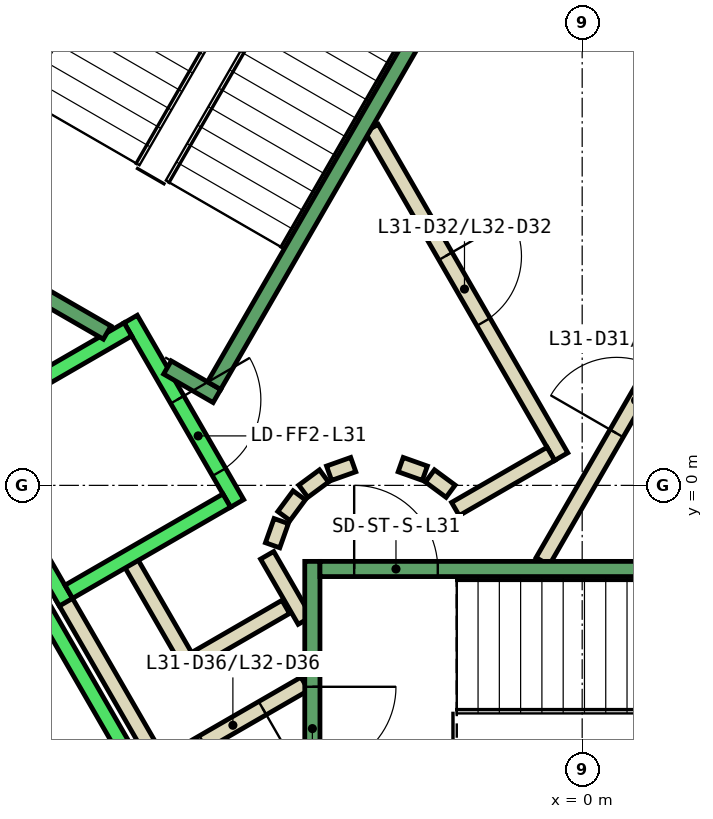
"""IFC4 building model, lengths in metres.
Left out: names, types, materials, properties, quantities, classifications, styles, units other than length and angle.
Written with IfcOpenShell. Run it as: python <this file> out.ifc"""

import sys

from ifc_helpers import new_model, si_unit, direction, frame, frame_2d, origin, place, context, subcontext, project, spatial, polyline, rectangle, outline, extrude, element, fill, save


model = new_model("IFC4")
c1 = context("Model", 3, precision=1e-05, world=origin(), true_north=direction((0.0, 1.0)))
c2 = subcontext(c1, "Body", "Model", "MODEL_VIEW")
j1 = project(units=[si_unit("LENGTHUNIT", "METRE"), si_unit("PLANEANGLEUNIT", "RADIAN")], contexts=[c1])
p1 = place(None, origin())
s1 = spatial("IfcSite", under=j1, at=p1, CompositionType="ELEMENT")
p2 = place(p1, origin())
s2 = spatial("IfcBuilding", under=s1, at=p2, CompositionType="ELEMENT")
p3 = place(p2, frame((0.0, 0.0, 142.4)))
s3 = spatial("IfcBuildingStorey", under=s2, at=p3, CompositionType="ELEMENT", Elevation=142.4)
p4 = place(p3, frame((0.0, 0.0, -0.4)))
e1 = element("IfcWall", 1, at=p4, inside=s3, PredefinedType="SHEAR", context=c2, shape_type="SweptSolid", body=[
    extrude(outline(polyline([(-12.267, 5.252), (-11.575, 4.852), (-6.466, 13.7), (-6.928, 14.5), (-12.267, 5.252)])), origin(), (0.0, 0.0, 1.0), 4.2),
])
p5 = place(p3, frame((0.0, 0.0, -0.4)))
e2 = element("IfcWall", 2, at=p5, inside=s3, PredefinedType="SHEAR", context=c2, shape_type="SweptSolid", body=[
    extrude(outline(polyline([(-13.856, 2.5), (-6.928, -9.5), (-6.466, -8.7), (-12.933, 2.5), (-13.856, 2.5)])), origin(), (0.0, 0.0, 1.0), 4.2),
])
p6 = place(p3, frame((-3.9, -1.599, 0.0), z_axis=(0.0, 0.0, 1.0), x_axis=(-0.865969445389, -0.500096910261, 0.0)))
e3 = element("IfcWall", 3, at=p6, inside=s3, PredefinedType="PARTITIONING", context=c2, shape_type="SweptSolid", body=[
    extrude(rectangle(XDim=1.373, YDim=0.2, at=frame_2d((0.687, 0.0))), origin(), (0.0, 0.0, 1.0), 3.8),
])
p7 = place(p3, frame((-5.126, -2.422, 0.0), z_axis=(0.0, 0.0, 1.0), x_axis=(-0.500062241894, 0.865989465428, 0.0)))
e4 = element("IfcWall", 4, at=p7, inside=s3, PredefinedType="PARTITIONING", context=c2, shape_type="SweptSolid", body=[
    extrude(rectangle(XDim=1.7, YDim=0.2, at=frame_2d((0.85, 0.0))), origin(), (0.0, 0.0, 1.0), 3.8),
])
p8 = place(p3, frame((-3.65, -2.61, 0.0), z_axis=(0.0, 0.0, 1.0), x_axis=(-0.866072462134, -0.499918483688, 0.0)))
e5 = element("IfcWall", 5, at=p8, inside=s3, PredefinedType="PARTITIONING", context=c2, shape_type="SweptSolid", body=[
    extrude(rectangle(XDim=2.084, YDim=0.2, at=frame_2d((1.042, 0.0))), origin(), (0.0, 0.0, 1.0), 3.8),
])
p9 = place(p8, frame((0.642, 0.0, 0.0)))
e6 = element("IfcOpeningElement", 6, at=p9, cuts=e5, PredefinedType="OPENING", context=c2, shape_type="SweptSolid", body=[
    extrude(rectangle(XDim=0.9, YDim=2.1, at=frame_2d((0.45, 1.05))), frame((0.0, 0.11, 0.0), z_axis=(0.0, -1.0, 0.0), x_axis=(1.0, 0.0, 0.0)), (0.0, 0.0, 1.0), 0.22),
])
p10 = place(p3, frame((-5.492, -3.788, 0.0), z_axis=(0.0, 0.0, 1.0), x_axis=(-0.500008949224, 0.866020236886, 0.0)))
e7 = element("IfcWall", 7, at=p10, inside=s3, PredefinedType="PARTITIONING", context=c2, shape_type="SweptSolid", body=[
    extrude(rectangle(XDim=2.68, YDim=0.2, at=frame_2d((1.34, 0.0))), origin(), (0.0, 0.0, 1.0), 3.8),
])
p11 = place(p3, frame((-4.145, -0.92, 0.0), z_axis=(0.0, 0.0, 1.0), x_axis=(0.499743786207, -0.866173278362, 0.0)))
e8 = element("IfcWall", 8, at=p11, inside=s3, PredefinedType="PARTITIONING", context=c2, shape_type="SweptSolid", body=[
    extrude(rectangle(XDim=0.991, YDim=0.2, at=frame_2d((0.495, 0.0))), origin(), (0.0, 0.0, 1.0), 3.8),
])
p12 = place(p3, frame((-0.52, -1.0, 0.0), z_axis=(0.0, 0.0, 1.0), x_axis=(0.50011622646, 0.865958290007, 0.0)))
e9 = element("IfcWall", 9, at=p12, inside=s3, PredefinedType="PARTITIONING", context=c2, shape_type="SweptSolid", body=[
    extrude(rectangle(XDim=4.991, YDim=0.2, at=frame_2d((2.496, 0.0))), origin(), (0.0, 0.0, 1.0), 3.8),
])
p13 = place(p12, frame((1.945, 0.0, 0.0)))
e10 = element("IfcOpeningElement", 10, at=p13, cuts=e9, PredefinedType="OPENING", context=c2, shape_type="SweptSolid", body=[
    extrude(rectangle(XDim=1.0, YDim=2.1, at=frame_2d((0.5, 1.05))), frame((0.0, 0.11, 0.0), z_axis=(0.0, -1.0, 0.0), x_axis=(1.0, 0.0, 0.0)), (0.0, 0.0, 1.0), 0.22),
])
p14 = place(p3, frame((-2.771, 4.7, 0.0), z_axis=(0.0, 0.0, 1.0), x_axis=(0.499969479948, -0.866043023828, 0.0)))
e11 = element("IfcWall", 11, at=p14, inside=s3, PredefinedType="PARTITIONING", context=c2, shape_type="SweptSolid", body=[
    extrude(rectangle(XDim=4.99, YDim=0.2, at=frame_2d((2.495, 0.0))), origin(), (0.0, 0.0, 1.0), 3.8),
])
p15 = place(p14, frame((1.945, 0.0, 0.0)))
e12 = element("IfcOpeningElement", 12, at=p15, cuts=e11, PredefinedType="OPENING", context=c2, shape_type="SweptSolid", body=[
    extrude(rectangle(XDim=1.0, YDim=2.1, at=frame_2d((0.5, 1.05))), frame((0.0, 0.11, 0.0), z_axis=(0.0, -1.0, 0.0), x_axis=(1.0, 0.0, 0.0)), (0.0, 0.0, 1.0), 0.22),
])
p16 = place(p3, frame((-0.412, 0.414, 0.0), z_axis=(0.0, 0.0, 1.0), x_axis=(-0.866017369001, -0.500013916395, 0.0)))
e13 = element("IfcWall", 13, at=p16, inside=s3, PredefinedType="PARTITIONING", context=c2, shape_type="SweptSolid", body=[
    extrude(rectangle(XDim=1.45, YDim=0.2, at=frame_2d((0.725, 0.0))), origin(), (0.0, 0.0, 1.0), 3.8),
])
p17 = place(p3, frame((-1.731, -0.077, 0.0), z_axis=(0.0, 0.0, 1.0), x_axis=(-0.804311165252, 0.594208338422, 0.0)))
e14 = element("IfcWall", 14, at=p17, inside=s3, PredefinedType="PARTITIONING", context=c2, shape_type="SweptSolid", body=[
    extrude(rectangle(XDim=0.338, YDim=0.2, at=frame_2d((0.169, 0.0))), origin(), (0.0, 0.0, 1.0), 3.8),
])
p18 = place(p3, frame((-2.07, 0.16, 0.0), z_axis=(0.0, 0.0, 1.0), x_axis=(-0.942199461132, 0.335052496547, 0.0)))
e15 = element("IfcWall", 15, at=p18, inside=s3, PredefinedType="PARTITIONING", context=c2, shape_type="SweptSolid", body=[
    extrude(rectangle(XDim=0.337, YDim=0.2, at=frame_2d((0.169, 0.0))), origin(), (0.0, 0.0, 1.0), 3.8),
])
p19 = place(p3, frame((-3.012, 0.273, 0.0), z_axis=(0.0, 0.0, 1.0), x_axis=(-0.942280615813, -0.334824194261, 0.0)))
e16 = element("IfcWall", 16, at=p19, inside=s3, PredefinedType="PARTITIONING", context=c2, shape_type="SweptSolid", body=[
    extrude(rectangle(XDim=0.338, YDim=0.2, at=frame_2d((0.169, 0.0))), origin(), (0.0, 0.0, 1.0), 3.8),
])
p20 = place(p3, frame((-3.397, 0.124, 0.0), z_axis=(0.0, 0.0, 1.0), x_axis=(-0.804311165252, -0.594208338422, 0.0)))
e17 = element("IfcWall", 17, at=p20, inside=s3, PredefinedType="PARTITIONING", context=c2, shape_type="SweptSolid", body=[
    extrude(rectangle(XDim=0.338, YDim=0.2, at=frame_2d((0.169, 0.0))), origin(), (0.0, 0.0, 1.0), 3.8),
])
p21 = place(p3, frame((-3.723, -0.131, 0.0), z_axis=(0.0, 0.0, 1.0), x_axis=(-0.594675113454, -0.803966112121, 0.0)))
e18 = element("IfcWall", 18, at=p21, inside=s3, PredefinedType="PARTITIONING", context=c2, shape_type="SweptSolid", body=[
    extrude(rectangle(XDim=0.338, YDim=0.2, at=frame_2d((0.169, 0.0))), origin(), (0.0, 0.0, 1.0), 3.8),
])
p22 = place(p3, frame((-3.96, -0.47, 0.0), z_axis=(0.0, 0.0, 1.0), x_axis=(-0.334824194261, -0.942280615813, 0.0)))
e19 = element("IfcWall", 19, at=p22, inside=s3, PredefinedType="PARTITIONING", context=c2, shape_type="SweptSolid", body=[
    extrude(rectangle(XDim=0.338, YDim=0.2, at=frame_2d((0.169, 0.0))), origin(), (0.0, 0.0, 1.0), 3.8),
])
p23 = place(p3, frame((-5.94, 2.188, 0.0), z_axis=(0.0, 0.0, 1.0), x_axis=(0.49994636267, -0.866056369097, 0.0)))
e20 = element("IfcWall", 20, at=p23, inside=s3, PredefinedType="STANDARD", context=c2, shape_type="SweptSolid", body=[
    extrude(rectangle(XDim=2.8, YDim=0.2, at=frame_2d((1.4, 0.0))), origin(), (0.0, 0.0, 1.0), 3.8),
])
p24 = place(p23, frame((1.225, 0.0, 0.0)))
e21 = element("IfcOpeningElement", 21, at=p24, cuts=e20, PredefinedType="OPENING", context=c2, shape_type="SweptSolid", body=[
    extrude(rectangle(XDim=1.1, YDim=2.1, at=frame_2d((0.55, 1.05))), frame((0.0, 0.11, 0.0), z_axis=(0.0, -1.0, 0.0), x_axis=(1.0, 0.0, 0.0)), (0.0, 0.0, 1.0), 0.22),
])
p25 = place(p3, frame((-8.192, 0.888, 0.0), z_axis=(0.0, 0.0, 1.0), x_axis=(0.49994636267, -0.866056369097, 0.0)))
e22 = element("IfcWall", 22, at=p25, inside=s3, PredefinedType="STANDARD", context=c2, shape_type="SweptSolid", body=[
    extrude(rectangle(XDim=2.8, YDim=0.2, at=frame_2d((1.4, 0.0))), origin(), (0.0, 0.0, 1.0), 3.8),
])
for number, where, z_axis, x_axis in (
    (23, (-5.977, 2.052, 0.0), (0.0, 0.0, 1.0), (-0.866, -0.5, 0.0)),
    (24, (-4.677, -0.2, 0.0), (0.0, 0.0, 1.0), (-0.866, -0.5, 0.0)),
):
    element("IfcWall", number, at=place(p3, frame(where, z_axis=z_axis, x_axis=x_axis)), inside=s3, PredefinedType="STANDARD", context=c2, shape_type="SweptSolid", body=[
        extrude(rectangle(XDim=2.399, YDim=0.2, at=frame_2d((1.2, 0.0))), origin(), (0.0, 0.0, 1.0), 3.8),
    ])
p26 = place(p3, frame((-9.751, 2.99, 0.0), z_axis=(0.0, 0.0, 1.0), x_axis=(0.50000090737, -0.866024879913, 0.0)))
e25 = element("IfcWall", 25, at=p26, inside=s3, PredefinedType="STANDARD", context=c2, shape_type="SweptSolid", body=[
    extrude(rectangle(XDim=10.6, YDim=0.2, at=frame_2d((5.3, 0.0))), origin(), (0.0, 0.0, 1.0), 3.8),
])
p27 = place(p3, frame((-3.55, -1.0, 0.0), z_axis=(0.0, 0.0, 1.0), x_axis=(0.0, -1.0, 0.0)))
e26 = element("IfcWall", 26, at=p27, inside=s3, PredefinedType="STANDARD", context=c2, shape_type="SweptSolid", body=[
    extrude(rectangle(XDim=4.4, YDim=0.2, at=frame_2d((2.2, 0.0))), origin(), (0.0, 0.0, 1.0), 3.8),
])
p28 = place(p27, frame((1.65, 0.0, 0.0)))
e27 = element("IfcOpeningElement", 27, at=p28, cuts=e26, PredefinedType="OPENING", context=c2, shape_type="SweptSolid", body=[
    extrude(rectangle(XDim=1.1, YDim=2.2, at=frame_2d((0.55, 1.1))), frame((0.0, 0.11, 0.0), z_axis=(0.0, -1.0, 0.0), x_axis=(1.0, 0.0, 0.0)), (0.0, 0.0, 1.0), 0.22),
])
p29 = place(p3, frame((-3.45, -1.1, 0.0), z_axis=(0.0, 0.0, 1.0), x_axis=(1.0, 0.0, 0.0)))
e28 = element("IfcWall", 28, at=p29, inside=s3, PredefinedType="STANDARD", context=c2, shape_type="SweptSolid", body=[
    extrude(rectangle(XDim=6.9, YDim=0.2, at=frame_2d((3.45, 0.0))), origin(), (0.0, 0.0, 1.0), 3.8),
])
p30 = place(p29, frame((0.45, 0.0, 0.0)))
e29 = element("IfcOpeningElement", 29, at=p30, cuts=e28, PredefinedType="OPENING", context=c2, shape_type="SweptSolid", body=[
    extrude(rectangle(XDim=1.1, YDim=2.2, at=frame_2d((0.55, 1.1))), frame((0.0, 0.11, 0.0), z_axis=(0.0, -1.0, 0.0), x_axis=(1.0, 0.0, 0.0)), (0.0, 0.0, 1.0), 0.22),
])
p31 = place(p3, frame((-6.25, 2.01, 0.0), z_axis=(0.0, 0.0, 1.0), x_axis=(-0.86611865017, 0.499838457731, 0.0)))
e30 = element("IfcWall", 30, at=p31, inside=s3, PredefinedType="STANDARD", context=c2, shape_type="SweptSolid", body=[
    extrude(rectangle(XDim=2.733, YDim=0.2, at=frame_2d((1.366, 0.0))), origin(), (0.0, 0.0, 1.0), 3.8),
])
p32 = place(p3, frame((-4.806, 1.176, 0.0), z_axis=(0.0, 0.0, 1.0), x_axis=(-0.866558586415, 0.499075361355, 0.0)))
e31 = element("IfcWall", 31, at=p32, inside=s3, PredefinedType="STANDARD", context=c2, shape_type="SweptSolid", body=[
    extrude(rectangle(XDim=0.751, YDim=0.2, at=frame_2d((0.376, 0.0))), origin(), (0.0, 0.0, 1.0), 3.8),
])
p33 = place(p3, frame((-1.393, 7.288, 0.0), z_axis=(0.0, 0.0, 1.0), x_axis=(-0.499963383562, -0.866046543262, 0.0)))
e32 = element("IfcWall", 32, at=p33, inside=s3, PredefinedType="STANDARD", context=c2, shape_type="SweptSolid", body=[
    extrude(rectangle(XDim=6.9, YDim=0.2, at=frame_2d((3.45, 0.0))), origin(), (0.0, 0.0, 1.0), 3.8),
])
p34 = place(p33, frame((0.45, 0.0, 0.0)))
e33 = element("IfcOpeningElement", 33, at=p34, cuts=e32, PredefinedType="OPENING", context=c2, shape_type="SweptSolid", body=[
    extrude(rectangle(XDim=1.1, YDim=2.2, at=frame_2d((0.55, 1.1))), frame((0.0, 0.11, 0.0), z_axis=(0.0, -1.0, 0.0), x_axis=(1.0, 0.0, 0.0)), (0.0, 0.0, 1.0), 0.22),
])
p35 = place(p3, frame((-5.03, 9.388, 0.0), z_axis=(0.0, 0.0, 1.0), x_axis=(-0.499978703459, -0.866037698999, 0.0)))
e34 = element("IfcWall", 34, at=p35, inside=s3, PredefinedType="STANDARD", context=c2, shape_type="SweptSolid", body=[
    extrude(rectangle(XDim=6.9, YDim=0.2, at=frame_2d((3.45, 0.0))), origin(), (0.0, 0.0, 1.0), 3.8),
])
p36 = place(p13, origin())
e35 = element("IfcDoor", 35, at=p36, inside=s3, OperationType="SINGLE_SWING_LEFT", PredefinedType="DOOR", context=c2, shape_type="SweptSolid", body=[
    extrude(rectangle(XDim=1.0, YDim=2.1, at=frame_2d((0.5, 1.05))), frame((0.0, 0.025, 0.0), z_axis=(0.0, -1.0, 0.0), x_axis=(1.0, 0.0, 0.0)), (0.0, 0.0, 1.0), 0.05),
])
fill(e10, e35)
p37 = place(p15, origin())
e36 = element("IfcDoor", 36, at=p37, inside=s3, OperationType="SINGLE_SWING_RIGHT", PredefinedType="DOOR", context=c2, shape_type="SweptSolid", body=[
    extrude(rectangle(XDim=1.0, YDim=2.1, at=frame_2d((0.5, 1.05))), frame((0.0, 0.025, 0.0), z_axis=(0.0, -1.0, 0.0), x_axis=(1.0, 0.0, 0.0)), (0.0, 0.0, 1.0), 0.05),
])
fill(e12, e36)
p38 = place(p9, origin())
e37 = element("IfcDoor", 37, at=p38, inside=s3, OperationType="SINGLE_SWING_LEFT", PredefinedType="DOOR", context=c2, shape_type="SweptSolid", body=[
    extrude(rectangle(XDim=0.9, YDim=2.1, at=frame_2d((0.45, 1.05))), frame((0.0, 0.025, 0.0), z_axis=(0.0, -1.0, 0.0), x_axis=(1.0, 0.0, 0.0)), (0.0, 0.0, 1.0), 0.05),
])
fill(e6, e37)
p39 = place(p24, origin())
e38 = element("IfcDoor", 38, at=p39, inside=s3, OperationType="SLIDING_TO_LEFT", PredefinedType="DOOR", context=c2, shape_type="SweptSolid", body=[
    extrude(rectangle(XDim=1.1, YDim=2.1, at=frame_2d((0.55, 1.05))), frame((0.0, 0.025, 0.0), z_axis=(0.0, -1.0, 0.0), x_axis=(1.0, 0.0, 0.0)), (0.0, 0.0, 1.0), 0.05),
])
fill(e21, e38)
p40 = place(p30, origin())
e39 = element("IfcDoor", 39, at=p40, inside=s3, OperationType="SINGLE_SWING_LEFT", PredefinedType="DOOR", context=c2, shape_type="SweptSolid", body=[
    extrude(rectangle(XDim=1.1, YDim=2.2, at=frame_2d((0.55, 1.1))), frame((0.0, 0.025, 0.0), z_axis=(0.0, -1.0, 0.0), x_axis=(1.0, 0.0, 0.0)), (0.0, 0.0, 1.0), 0.05),
])
fill(e29, e39)
p41 = place(p28, origin())
e40 = element("IfcDoor", 40, at=p41, inside=s3, OperationType="SINGLE_SWING_LEFT", PredefinedType="DOOR", context=c2, shape_type="SweptSolid", body=[
    extrude(rectangle(XDim=1.1, YDim=2.2, at=frame_2d((0.55, 1.1))), frame((0.0, 0.025, 0.0), z_axis=(0.0, -1.0, 0.0), x_axis=(1.0, 0.0, 0.0)), (0.0, 0.0, 1.0), 0.05),
])
fill(e27, e40)
save(model, sys.argv[1])
